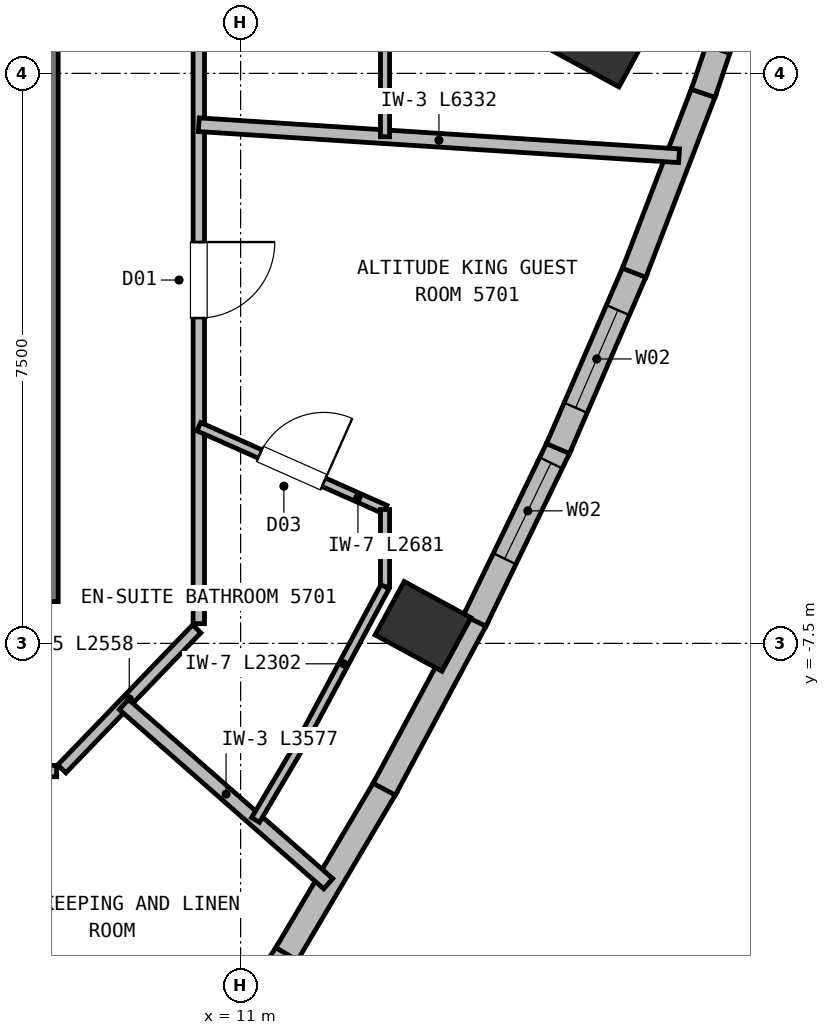
"""IFC4 building model, lengths in metres.
Left out: names, types, materials, properties, quantities, classifications, styles, units other than length and angle.
Written with IfcOpenShell. Run it as: python <this file> out.ifc"""

import sys

from ifc_helpers import new_model, si_unit, direction, frame, frame_2d, origin, origin_2d, place, context, subcontext, project, spatial, rectangle, extrude, element, fill, save


model = new_model("IFC4")
c1 = context("Model", 3, precision=1e-05, world=origin(), true_north=direction((0.0, 1.0)))
c2 = subcontext(c1, "Body", "Model", "MODEL_VIEW")
j1 = project(units=[si_unit("LENGTHUNIT", "METRE"), si_unit("PLANEANGLEUNIT", "RADIAN")], contexts=[c1])
p1 = place(None, origin())
s1 = spatial("IfcSite", under=j1, at=p1, CompositionType="ELEMENT")
p2 = place(p1, origin())
s2 = spatial("IfcBuilding", under=s1, at=p2, CompositionType="ELEMENT")
p3 = place(p2, frame((0.0, 0.0, 216.95)))
s3 = spatial("IfcBuildingStorey", under=s2, at=p3, CompositionType="ELEMENT", Elevation=216.95)
p4 = place(p3, frame((8.35, -6.95, 0.0), z_axis=(0.0, 0.0, 1.0), x_axis=(0.0, 1.0, 0.0)))
e1 = element("IfcWall", 1, at=p4, inside=s3, PredefinedType="SHEAR", context=c2, shape_type="SweptSolid", body=[
    extrude(rectangle(XDim=8.1, YDim=0.5, at=frame_2d((4.05, 0.0))), origin(), (0.0, 0.0, 1.0), 3.55),
])
for number, where, z_axis, x_axis in (
    (2, (13.4, -7.276, 0.0), (0.0, 0.0, 1.0), (0.477, 0.879, 0.0)),
    (3, (15.73, 0.412, 0.0), (0.0, 0.0, 1.0), (0.477, 0.879, 0.0)),
):
    element("IfcColumn", number, at=place(p3, frame(where, z_axis=z_axis, x_axis=x_axis)), inside=s3, PredefinedType="COLUMN", context=c2, shape_type="SweptSolid", body=[
        extrude(rectangle(XDim=0.8, YDim=1.0, at=origin_2d()), origin(), (0.0, 0.0, 1.0), 3.8),
    ])
p5 = place(p3, frame((11.632, -11.545, 0.0), z_axis=(0.0, 0.0, 1.0), x_axis=(-0.544435959457, -0.838802411805, 0.0)))
e4 = element("IfcWall", 4, at=p5, inside=s3, PredefinedType="SOLIDWALL", context=c2, shape_type="SweptSolid", body=[
    extrude(rectangle(XDim=2.579, YDim=0.33, at=frame_2d((1.29, 0.0))), origin(), (0.0, 0.0, 1.0), 3.55),
])
p6 = place(p5, frame((0.59, 0.0, 0.72)))
e5 = element("IfcOpeningElement", 5, at=p6, cuts=e4, PredefinedType="OPENING", context=c2, shape_type="SweptSolid", body=[
    extrude(rectangle(XDim=1.4, YDim=1.84, at=frame_2d((0.7, 0.92))), frame((0.0, 0.175, 0.0), z_axis=(0.0, -1.0, 0.0), x_axis=(1.0, 0.0, 0.0)), (0.0, 0.0, 1.0), 0.35),
])
p7 = place(p3, frame((12.914, -9.375, 0.0), z_axis=(0.0, 0.0, 1.0), x_axis=(-0.509023691709, -0.860752508727, 0.0)))
e6 = element("IfcWall", 6, at=p7, inside=s3, PredefinedType="SOLIDWALL", context=c2, shape_type="SweptSolid", body=[
    extrude(rectangle(XDim=2.57, YDim=0.33, at=frame_2d((1.285, 0.0))), origin(), (0.0, 0.0, 1.0), 3.55),
])
p8 = place(p3, frame((14.102, -7.157, 0.0), z_axis=(0.0, 0.0, 1.0), x_axis=(-0.472567241961, -0.881294616928, 0.0)))
e7 = element("IfcWall", 7, at=p8, inside=s3, PredefinedType="SOLIDWALL", context=c2, shape_type="SweptSolid", body=[
    extrude(rectangle(XDim=2.566, YDim=0.33, at=frame_2d((1.283, 0.0))), origin(), (0.0, 0.0, 1.0), 3.55),
])
p9 = place(p3, frame((15.196, -4.892, 0.0), z_axis=(0.0, 0.0, 1.0), x_axis=(-0.435185371062, -0.900340875898, 0.0)))
e8 = element("IfcWall", 8, at=p9, inside=s3, PredefinedType="SOLIDWALL", context=c2, shape_type="SweptSolid", body=[
    extrude(rectangle(XDim=2.566, YDim=0.33, at=frame_2d((1.283, 0.0))), origin(), (0.0, 0.0, 1.0), 3.55),
])
p10 = place(p9, frame((0.26, 0.0, 0.72)))
e9 = element("IfcOpeningElement", 9, at=p10, cuts=e8, PredefinedType="OPENING", context=c2, shape_type="SweptSolid", body=[
    extrude(rectangle(XDim=1.4, YDim=1.84, at=frame_2d((0.7, 0.92))), frame((0.0, 0.175, 0.0), z_axis=(0.0, -1.0, 0.0), x_axis=(1.0, 0.0, 0.0)), (0.0, 0.0, 1.0), 0.35),
])
p11 = place(p3, frame((16.196, -2.578, 0.0), z_axis=(0.0, 0.0, 1.0), x_axis=(-0.397103611511, -0.917773785704, 0.0)))
e10 = element("IfcWall", 10, at=p11, inside=s3, PredefinedType="SOLIDWALL", context=c2, shape_type="SweptSolid", body=[
    extrude(rectangle(XDim=2.571, YDim=0.33, at=frame_2d((1.285, 0.0))), origin(), (0.0, 0.0, 1.0), 3.55),
])
p12 = place(p11, frame((0.585, 0.0, 0.72)))
e11 = element("IfcOpeningElement", 11, at=p12, cuts=e10, PredefinedType="OPENING", context=c2, shape_type="SweptSolid", body=[
    extrude(rectangle(XDim=1.4, YDim=1.84, at=frame_2d((0.7, 0.92))), frame((0.0, 0.175, 0.0), z_axis=(0.0, -1.0, 0.0), x_axis=(1.0, 0.0, 0.0)), (0.0, 0.0, 1.0), 0.35),
])
p13 = place(p3, frame((17.102, -0.216, 0.0), z_axis=(0.0, 0.0, 1.0), x_axis=(-0.358528725074, -0.933518694669, 0.0)))
e12 = element("IfcWall", 12, at=p13, inside=s3, PredefinedType="SOLIDWALL", context=c2, shape_type="SweptSolid", body=[
    extrude(rectangle(XDim=2.579, YDim=0.33, at=frame_2d((1.29, 0.0))), origin(), (0.0, 0.0, 1.0), 3.55),
])
p14 = place(p3, frame((17.914, 2.193, 0.0), z_axis=(0.0, 0.0, 1.0), x_axis=(-0.319700444906, -0.94751866764, 0.0)))
e13 = element("IfcWall", 13, at=p14, inside=s3, PredefinedType="SOLIDWALL", context=c2, shape_type="SweptSolid", body=[
    extrude(rectangle(XDim=2.593, YDim=0.33, at=frame_2d((1.296, 0.0))), origin(), (0.0, 0.0, 1.0), 3.55),
])
p15 = place(p14, frame((0.596, 0.0, 0.72)))
e14 = element("IfcOpeningElement", 14, at=p15, cuts=e13, PredefinedType="OPENING", context=c2, shape_type="SweptSolid", body=[
    extrude(rectangle(XDim=1.4, YDim=1.84, at=frame_2d((0.7, 0.92))), frame((0.0, 0.175, 0.0), z_axis=(0.0, -1.0, 0.0), x_axis=(1.0, 0.0, 0.0)), (0.0, 0.0, 1.0), 0.35),
])
p16 = place(p3, frame((8.58, -9.18, 0.0), z_axis=(0.0, 0.0, 1.0), x_axis=(-1.0, 0.0, 0.0)))
e15 = element("IfcWall", 15, at=p16, inside=s3, PredefinedType="PARTITIONING", context=c2, shape_type="SweptSolid", body=[
    extrude(rectangle(XDim=17.16, YDim=0.15, at=frame_2d((8.58, 0.0))), origin(), (0.0, 0.0, 1.0), 3.23),
])
p17 = place(p16, frame((3.916, 0.0, 0.0)))
e16 = element("IfcOpeningElement", 16, at=p17, cuts=e15, PredefinedType="OPENING", context=c2, shape_type="SweptSolid", body=[
    extrude(rectangle(XDim=0.95, YDim=2.1, at=frame_2d((0.475, 1.05))), frame((0.0, 0.085, 0.0), z_axis=(0.0, -1.0, 0.0), x_axis=(1.0, 0.0, 0.0)), (0.0, 0.0, 1.0), 0.17),
])
p18 = place(p16, frame((1.363, 0.0, 0.0)))
e17 = element("IfcOpeningElement", 17, at=p18, cuts=e15, PredefinedType="OPENING", context=c2, shape_type="SweptSolid", body=[
    extrude(rectangle(XDim=1.0, YDim=2.15, at=frame_2d((0.5, 1.075))), frame((0.0, 0.085, 0.0), z_axis=(0.0, -1.0, 0.0), x_axis=(1.0, 0.0, 0.0)), (0.0, 0.0, 1.0), 0.17),
])
p19 = place(p16, frame((12.038, 0.0, 0.0)))
e18 = element("IfcOpeningElement", 18, at=p19, cuts=e15, PredefinedType="OPENING", context=c2, shape_type="SweptSolid", body=[
    extrude(rectangle(XDim=1.06, YDim=2.15, at=frame_2d((0.53, 1.075))), frame((0.0, 0.085, 0.0), z_axis=(0.0, -1.0, 0.0), x_axis=(1.0, 0.0, 0.0)), (0.0, 0.0, 1.0), 0.17),
])
p20 = place(p16, frame((6.251, 0.0, 0.0)))
e19 = element("IfcOpeningElement", 19, at=p20, cuts=e15, PredefinedType="OPENING", context=c2, shape_type="SweptSolid", body=[
    extrude(rectangle(XDim=1.06, YDim=2.15, at=frame_2d((0.53, 1.075))), frame((0.0, 0.085, 0.0), z_axis=(0.0, -1.0, 0.0), x_axis=(1.0, 0.0, 0.0)), (0.0, 0.0, 1.0), 0.17),
])
p21 = place(p3, frame((10.422, -7.309, 0.0), z_axis=(0.0, 0.0, 1.0), x_axis=(-0.693764562202, -0.720201869085, 0.0)))
e20 = element("IfcWall", 20, at=p21, inside=s3, PredefinedType="PARTITIONING", context=c2, shape_type="SweptSolid", body=[
    extrude(rectangle(XDim=2.558, YDim=0.15, at=frame_2d((1.279, 0.0))), origin(), (0.0, 0.0, 1.0), 3.23),
])
p22 = place(p3, frame((10.45, 7.24, 0.0), z_axis=(0.0, 0.0, 1.0), x_axis=(0.0, -1.0, 0.0)))
e21 = element("IfcWall", 21, at=p22, inside=s3, PredefinedType="PARTITIONING", context=c2, shape_type="SweptSolid", body=[
    extrude(rectangle(XDim=14.48, YDim=0.15, at=frame_2d((7.24, 0.0))), origin(), (0.0, 0.0, 1.0), 3.55),
])
p23 = place(p22, frame((9.459, 0.0, 0.0)))
e22 = element("IfcOpeningElement", 22, at=p23, cuts=e21, PredefinedType="OPENING", context=c2, shape_type="SweptSolid", body=[
    extrude(rectangle(XDim=1.0, YDim=2.15, at=frame_2d((0.5, 1.075))), frame((0.0, 0.085, 0.0), z_axis=(0.0, -1.0, 0.0), x_axis=(1.0, 0.0, 0.0)), (0.0, 0.0, 1.0), 0.17),
])
p24 = place(p22, frame((2.921, 0.0, 0.0)))
e23 = element("IfcOpeningElement", 23, at=p24, cuts=e21, PredefinedType="OPENING", context=c2, shape_type="SweptSolid", body=[
    extrude(rectangle(XDim=1.0, YDim=2.15, at=frame_2d((0.5, 1.075))), frame((0.0, 0.085, 0.0), z_axis=(0.0, -1.0, 0.0), x_axis=(1.0, 0.0, 0.0)), (0.0, 0.0, 1.0), 0.17),
])
p25 = place(p3, frame((9.464, -8.304, 0.0), z_axis=(0.0, 0.0, 1.0), x_axis=(0.751709245101, -0.659494663231, 0.0)))
e24 = element("IfcWall", 24, at=p25, inside=s3, PredefinedType="PARTITIONING", context=c2, shape_type="SweptSolid", body=[
    extrude(rectangle(XDim=3.577, YDim=0.18, at=frame_2d((1.789, 0.0))), origin(), (0.0, 0.0, 1.0), 3.55),
])
p26 = place(p3, frame((10.45, -4.649, 0.0), z_axis=(0.0, 0.0, 1.0), x_axis=(0.913676332544, -0.406442565867, 0.0)))
e25 = element("IfcWall", 25, at=p26, inside=s3, PredefinedType="PARTITIONING", context=c2, shape_type="SweptSolid", body=[
    extrude(rectangle(XDim=2.681, YDim=0.12, at=frame_2d((1.341, 0.0))), origin(), (0.0, 0.0, 1.0), 3.55),
])
p27 = place(p26, frame((0.881, 0.0, 0.0)))
e26 = element("IfcOpeningElement", 26, at=p27, cuts=e25, PredefinedType="OPENING", context=c2, shape_type="SweptSolid", body=[
    extrude(rectangle(XDim=0.92, YDim=2.1, at=frame_2d((0.46, 1.05))), frame((0.0, 0.07, 0.0), z_axis=(0.0, -1.0, 0.0), x_axis=(1.0, 0.0, 0.0)), (0.0, 0.0, 1.0), 0.14),
])
p28 = place(p3, frame((12.9, -5.739, 0.0), z_axis=(0.0, 0.0, 1.0), x_axis=(0.0, -1.0, 0.0)))
e27 = element("IfcWall", 27, at=p28, inside=s3, PredefinedType="PARTITIONING", context=c2, shape_type="SweptSolid", body=[
    extrude(rectangle(XDim=1.015, YDim=0.12, at=frame_2d((0.508, 0.0))), origin(), (0.0, 0.0, 1.0), 3.55),
])
p29 = place(p3, frame((11.812, -8.783, 0.0), z_axis=(0.0, 0.0, 1.0), x_axis=(0.472486272228, 0.881338029678, 0.0)))
e28 = element("IfcWall", 28, at=p29, inside=s3, PredefinedType="PARTITIONING", context=c2, shape_type="SweptSolid", body=[
    extrude(rectangle(XDim=2.302, YDim=0.12, at=frame_2d((1.151, 0.0))), origin(), (0.0, 0.0, 1.0), 3.55),
])
p30 = place(p3, frame((11.197, -9.824, 0.0), z_axis=(0.0, 0.0, 1.0), x_axis=(0.509110272453, 0.860701301546, 0.0)))
e29 = element("IfcWall", 29, at=p30, inside=s3, PredefinedType="PARTITIONING", context=c2, shape_type="SweptSolid", body=[
    extrude(rectangle(XDim=1.209, YDim=0.12, at=frame_2d((0.604, 0.0))), origin(), (0.0, 0.0, 1.0), 2.98),
])
p31 = place(p3, frame((10.45, -0.676, 0.0), z_axis=(0.0, 0.0, 1.0), x_axis=(0.997917550795, -0.064502417126, 0.0)))
e30 = element("IfcWall", 30, at=p31, inside=s3, PredefinedType="PARTITIONING", context=c2, shape_type="SweptSolid", body=[
    extrude(rectangle(XDim=6.332, YDim=0.18, at=frame_2d((3.166, 0.0))), origin(), (0.0, 0.0, 1.0), 3.55),
])
p32 = place(p3, frame((12.9, 2.53, 0.0), z_axis=(0.0, 0.0, 1.0), x_axis=(0.0, -1.0, 0.0)))
e31 = element("IfcWall", 31, at=p32, inside=s3, PredefinedType="PARTITIONING", context=c2, shape_type="SweptSolid", body=[
    extrude(rectangle(XDim=3.364, YDim=0.12, at=frame_2d((1.682, 0.0))), origin(), (0.0, 0.0, 1.0), 3.55),
])
p33 = place(p32, frame((1.222, 0.0, 0.0)))
e32 = element("IfcOpeningElement", 32, at=p33, cuts=e31, PredefinedType="OPENING", context=c2, shape_type="SweptSolid", body=[
    extrude(rectangle(XDim=0.92, YDim=2.1, at=frame_2d((0.46, 1.05))), frame((0.0, 0.07, 0.0), z_axis=(0.0, -1.0, 0.0), x_axis=(1.0, 0.0, 0.0)), (0.0, 0.0, 1.0), 0.14),
])
p34 = place(p3, frame((5.133, -9.18, 0.0), z_axis=(0.0, 0.0, 1.0), x_axis=(0.488070082924, -0.872804442103, 0.0)))
e33 = element("IfcWall", 33, at=p34, inside=s3, PredefinedType="PARTITIONING", context=c2, shape_type="SweptSolid", body=[
    extrude(rectangle(XDim=7.501, YDim=0.18, at=frame_2d((3.75, 0.0))), origin(), (0.0, 0.0, 1.0), 3.55),
])
p35 = place(p10, origin())
e34 = element("IfcWindow", 34, at=p35, inside=s3, PartitioningType="SINGLE_PANEL", PredefinedType="WINDOW", context=c2, shape_type="SweptSolid", body=[
    extrude(rectangle(XDim=1.4, YDim=1.84, at=frame_2d((0.7, 0.92))), frame((0.0, 0.03, 0.0), z_axis=(0.0, -1.0, 0.0), x_axis=(1.0, 0.0, 0.0)), (0.0, 0.0, 1.0), 0.06),
])
fill(e9, e34)
p36 = place(p12, origin())
e35 = element("IfcWindow", 35, at=p36, inside=s3, PartitioningType="SINGLE_PANEL", PredefinedType="WINDOW", context=c2, shape_type="SweptSolid", body=[
    extrude(rectangle(XDim=1.4, YDim=1.84, at=frame_2d((0.7, 0.92))), frame((0.0, 0.03, 0.0), z_axis=(0.0, -1.0, 0.0), x_axis=(1.0, 0.0, 0.0)), (0.0, 0.0, 1.0), 0.06),
])
fill(e11, e35)
p37 = place(p27, origin())
e36 = element("IfcDoor", 36, at=p37, inside=s3, OperationType="SINGLE_SWING_RIGHT", PredefinedType="DOOR", context=c2, shape_type="SweptSolid", body=[
    extrude(rectangle(XDim=0.92, YDim=2.1, at=frame_2d((0.46, 1.05))), frame((0.0, 0.025, 0.0), z_axis=(0.0, -1.0, 0.0), x_axis=(1.0, 0.0, 0.0)), (0.0, 0.0, 1.0), 0.05),
])
fill(e26, e36)
p38 = place(p23, origin())
e37 = element("IfcDoor", 37, at=p38, inside=s3, OperationType="SINGLE_SWING_LEFT", PredefinedType="DOOR", context=c2, shape_type="SweptSolid", body=[
    extrude(rectangle(XDim=1.0, YDim=2.15, at=frame_2d((0.5, 1.075))), frame((0.0, 0.025, 0.0), z_axis=(0.0, -1.0, 0.0), x_axis=(1.0, 0.0, 0.0)), (0.0, 0.0, 1.0), 0.05),
])
fill(e22, e37)
save(model, sys.argv[1])
